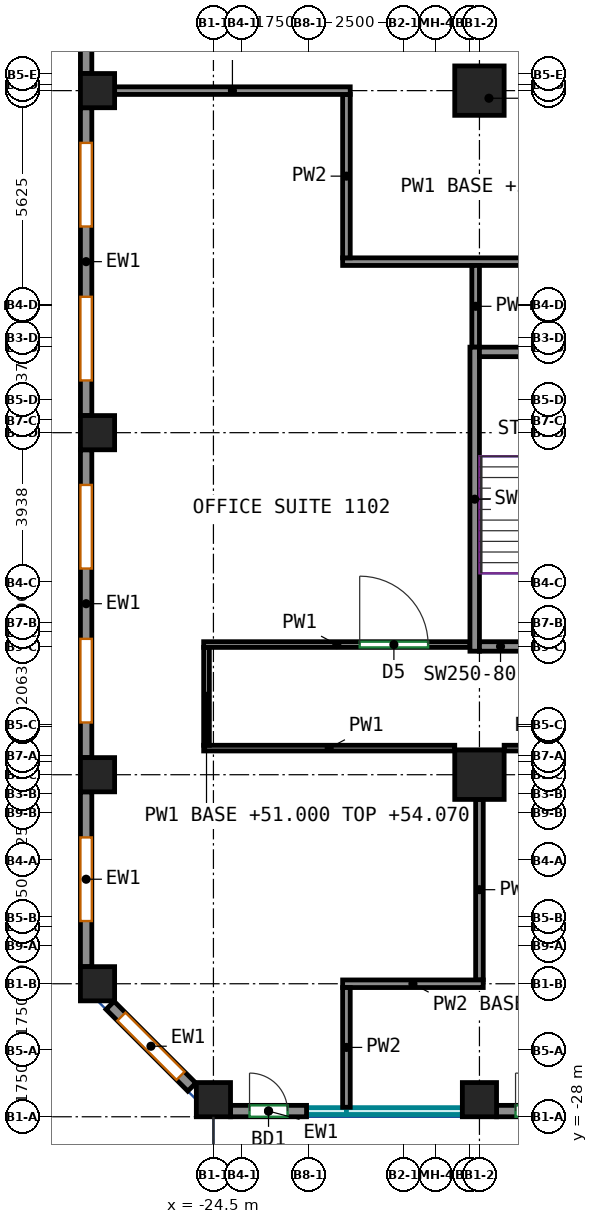
"""IFC4 building model, lengths in metres.
Left out: names, types, materials, properties, quantities, classifications, styles, units other than length and angle.
Written with IfcOpenShell. Run it as: python <this file> out.ifc"""

import sys

from ifc_helpers import new_model, si_unit, direction, frame, frame_2d, origin, origin_2d, place, context, subcontext, project, spatial, rectangle, extrude, source, transform, mapped, element, fill, save


model = new_model("IFC4")
c1 = context("Model", 3, precision=1e-05, world=origin(), true_north=direction((0.0, 1.0)))
c2 = subcontext(c1, "Body", "Model", "MODEL_VIEW")
j1 = project(units=[si_unit("LENGTHUNIT", "METRE"), si_unit("PLANEANGLEUNIT", "RADIAN")], contexts=[c1])
p1 = place(None, origin())
s1 = spatial("IfcSite", under=j1, at=p1, CompositionType="ELEMENT")
p2 = place(p1, origin())
s2 = spatial("IfcBuilding", under=s1, at=p2, CompositionType="ELEMENT")
p3 = place(p2, frame((0.0, 0.0, 51.0)))
s3 = spatial("IfcBuildingStorey", under=s2, at=p3, CompositionType="ELEMENT", Elevation=51.0)
m1 = source(origin(), c2, "Body", "SweptSolid", [
    extrude(rectangle(XDim=0.9, YDim=0.9, at=origin_2d()), origin(), (0.0, 0.0, 1.0), 3.72),
])
for number, where, z_axis, x_axis in (
    (1, (-27.55, -24.5, 0.0), (0.0, 0.0, 1.0), (1.0, 0.0, 0.0)),
    (2, (-27.55, -19.0, 0.0), (0.0, 0.0, 1.0), (1.0, 0.0, 0.0)),
    (3, (-27.55, -10.0, 0.0), (0.0, 0.0, 1.0), (1.0, 0.0, 0.0)),
    (4, (-27.55, -1.0, 0.0), (0.0, 0.0, 1.0), (1.0, 0.0, 0.0)),
    (5, (-24.5, -27.55, 0.0), (0.0, 0.0, 1.0), (1.0, 0.0, 0.0)),
    (6, (-17.5, -27.55, 0.0), (0.0, 0.0, 1.0), (1.0, 0.0, 0.0)),
):
    element("IfcColumn", number, at=place(p3, frame(where, z_axis=z_axis, x_axis=x_axis)), inside=s3, PredefinedType="COLUMN", context=c2, shape_type="MappedRepresentation", body=[
        mapped(m1, transform((0.0, 0.0, 0.0))),
    ])
m2 = source(origin(), c2, "Body", "SweptSolid", [
    extrude(rectangle(XDim=1.3, YDim=1.3, at=origin_2d()), origin(), (0.0, 0.0, 1.0), 3.72),
])
for number, where, z_axis, x_axis in (
    (7, (-17.5, -19.0, 0.0), (0.0, 0.0, 1.0), (1.0, 0.0, 0.0)),
    (8, (-17.5, -1.0, 0.0), (0.0, 0.0, 1.0), (1.0, 0.0, 0.0)),
):
    element("IfcColumn", number, at=place(p3, frame(where, z_axis=z_axis, x_axis=x_axis)), inside=s3, PredefinedType="COLUMN", context=c2, shape_type="MappedRepresentation", body=[
        mapped(m2, transform((0.0, 0.0, 0.0))),
    ])
m3 = source(origin(), c2, "Body", "SweptSolid", [
    extrude(rectangle(XDim=8.0, YDim=0.25, at=frame_2d((4.0, 0.0))), origin(), (0.0, 0.0, 1.0), 3.72),
])
p4 = place(p3, frame((-17.625, -15.75, 0.0), z_axis=(0.0, 0.0, 1.0), x_axis=(0.0, 1.0, 0.0)))
e9 = element("IfcWall", 9, at=p4, inside=s3, PredefinedType="SHEAR", context=c2, shape_type="MappedRepresentation", body=[
    mapped(m3, transform((0.0, 0.0, 0.0))),
])
m4 = source(origin(), c2, "Body", "SweptSolid", [
    extrude(rectangle(XDim=3.7, YDim=0.25, at=frame_2d((1.85, 0.0))), origin(), (0.0, 0.0, 1.0), 3.72),
])
p5 = place(p3, frame((-17.5, -15.625, 0.0), z_axis=(0.0, 0.0, 1.0), x_axis=(1.0, 0.0, 0.0)))
e10 = element("IfcWall", 10, at=p5, inside=s3, PredefinedType="SHEAR", context=c2, shape_type="MappedRepresentation", body=[
    mapped(m4, transform((0.0, 0.0, 0.0))),
])
p6 = place(p5, frame((1.25, 0.0, 0.0)))
e11 = element("IfcOpeningElement", 11, at=p6, cuts=e10, PredefinedType="OPENING", context=c2, shape_type="SweptSolid", body=[
    extrude(rectangle(XDim=1.2, YDim=2.1, at=frame_2d((0.6, 1.05))), frame((0.0, 0.135, 0.0), z_axis=(0.0, -1.0, 0.0), x_axis=(1.0, 0.0, 0.0)), (0.0, 0.0, 1.0), 0.27),
])
p7 = place(p3, frame((-17.5, -7.875, 0.0), z_axis=(0.0, 0.0, 1.0), x_axis=(1.0, 0.0, 0.0)))
e12 = element("IfcWall", 12, at=p7, inside=s3, PredefinedType="SHEAR", context=c2, shape_type="MappedRepresentation", body=[
    mapped(m4, transform((0.0, 0.0, 0.0))),
])
m5 = source(origin(), c2, "Body", "SweptSolid", [
    extrude(rectangle(XDim=2.0, YDim=0.3, at=frame_2d((1.0, 0.0))), origin(), (0.0, 0.0, 1.0), 3.72),
])
p8 = place(p3, frame((-24.05, -27.85, 0.0), z_axis=(0.0, 0.0, 1.0), x_axis=(1.0, 0.0, 0.0)))
e13 = element("IfcWall", 13, at=p8, inside=s3, PredefinedType="SOLIDWALL", context=c2, shape_type="MappedRepresentation", body=[
    mapped(m5, transform((0.0, 0.0, 0.0))),
])
p9 = place(p8, frame((0.5, 0.0, 0.0)))
e14 = element("IfcOpeningElement", 14, at=p9, cuts=e13, PredefinedType="OPENING", context=c2, shape_type="SweptSolid", body=[
    extrude(rectangle(XDim=1.0, YDim=2.1, at=frame_2d((0.5, 1.05))), frame((0.0, 0.16, 0.0), z_axis=(0.0, -1.0, 0.0), x_axis=(1.0, 0.0, 0.0)), (0.0, 0.0, 1.0), 0.32),
])
p10 = place(p3, frame((-17.05, -27.85, 0.0), z_axis=(0.0, 0.0, 1.0), x_axis=(1.0, 0.0, 0.0)))
e15 = element("IfcWall", 15, at=p10, inside=s3, PredefinedType="SOLIDWALL", context=c2, shape_type="MappedRepresentation", body=[
    mapped(m5, transform((0.0, 0.0, 0.0))),
])
p11 = place(p10, frame((0.5, 0.0, 0.0)))
e16 = element("IfcOpeningElement", 16, at=p11, cuts=e15, PredefinedType="OPENING", context=c2, shape_type="SweptSolid", body=[
    extrude(rectangle(XDim=1.0, YDim=2.1, at=frame_2d((0.5, 1.05))), frame((0.0, 0.16, 0.0), z_axis=(0.0, -1.0, 0.0), x_axis=(1.0, 0.0, 0.0)), (0.0, 0.0, 1.0), 0.32),
])
m6 = source(origin(), c2, "Body", "SweptSolid", [
    extrude(rectangle(XDim=8.1, YDim=0.3, at=frame_2d((4.05, 0.0))), origin(), (0.0, 0.0, 1.0), 3.72),
])
p12 = place(p3, frame((-27.85, 7.55, 0.0), z_axis=(0.0, 0.0, 1.0), x_axis=(0.0, -1.0, 0.0)))
e17 = element("IfcWall", 17, at=p12, inside=s3, PredefinedType="SOLIDWALL", context=c2, shape_type="MappedRepresentation", body=[
    mapped(m6, transform((0.0, 0.0, 0.0))),
])
p13 = place(p12, frame((0.925, 0.0, 0.7)))
e18 = element("IfcOpeningElement", 18, at=p13, cuts=e17, PredefinedType="OPENING", context=c2, shape_type="SweptSolid", body=[
    extrude(rectangle(XDim=2.2, YDim=2.25, at=frame_2d((1.1, 1.125))), frame((0.0, 0.16, 0.0), z_axis=(0.0, -1.0, 0.0), x_axis=(1.0, 0.0, 0.0)), (0.0, 0.0, 1.0), 0.32),
])
p14 = place(p12, frame((4.975, 0.0, 0.7)))
e19 = element("IfcOpeningElement", 19, at=p14, cuts=e17, PredefinedType="OPENING", context=c2, shape_type="SweptSolid", body=[
    extrude(rectangle(XDim=2.2, YDim=2.25, at=frame_2d((1.1, 1.125))), frame((0.0, 0.16, 0.0), z_axis=(0.0, -1.0, 0.0), x_axis=(1.0, 0.0, 0.0)), (0.0, 0.0, 1.0), 0.32),
])
p15 = place(p3, frame((-27.85, -1.45, 0.0), z_axis=(0.0, 0.0, 1.0), x_axis=(0.0, -1.0, 0.0)))
e20 = element("IfcWall", 20, at=p15, inside=s3, PredefinedType="SOLIDWALL", context=c2, shape_type="MappedRepresentation", body=[
    mapped(m6, transform((0.0, 0.0, 0.0))),
])
p16 = place(p15, frame((0.925, 0.0, 0.7)))
e21 = element("IfcOpeningElement", 21, at=p16, cuts=e20, PredefinedType="OPENING", context=c2, shape_type="SweptSolid", body=[
    extrude(rectangle(XDim=2.2, YDim=2.25, at=frame_2d((1.1, 1.125))), frame((0.0, 0.16, 0.0), z_axis=(0.0, -1.0, 0.0), x_axis=(1.0, 0.0, 0.0)), (0.0, 0.0, 1.0), 0.32),
])
p17 = place(p15, frame((4.975, 0.0, 0.7)))
e22 = element("IfcOpeningElement", 22, at=p17, cuts=e20, PredefinedType="OPENING", context=c2, shape_type="SweptSolid", body=[
    extrude(rectangle(XDim=2.2, YDim=2.25, at=frame_2d((1.1, 1.125))), frame((0.0, 0.16, 0.0), z_axis=(0.0, -1.0, 0.0), x_axis=(1.0, 0.0, 0.0)), (0.0, 0.0, 1.0), 0.32),
])
p18 = place(p3, frame((-27.85, -10.45, 0.0), z_axis=(0.0, 0.0, 1.0), x_axis=(0.0, -1.0, 0.0)))
e23 = element("IfcWall", 23, at=p18, inside=s3, PredefinedType="SOLIDWALL", context=c2, shape_type="MappedRepresentation", body=[
    mapped(m6, transform((0.0, 0.0, 0.0))),
])
p19 = place(p18, frame((0.925, 0.0, 0.7)))
e24 = element("IfcOpeningElement", 24, at=p19, cuts=e23, PredefinedType="OPENING", context=c2, shape_type="SweptSolid", body=[
    extrude(rectangle(XDim=2.2, YDim=2.25, at=frame_2d((1.1, 1.125))), frame((0.0, 0.16, 0.0), z_axis=(0.0, -1.0, 0.0), x_axis=(1.0, 0.0, 0.0)), (0.0, 0.0, 1.0), 0.32),
])
p20 = place(p18, frame((4.975, 0.0, 0.7)))
e25 = element("IfcOpeningElement", 25, at=p20, cuts=e23, PredefinedType="OPENING", context=c2, shape_type="SweptSolid", body=[
    extrude(rectangle(XDim=2.2, YDim=2.25, at=frame_2d((1.1, 1.125))), frame((0.0, 0.16, 0.0), z_axis=(0.0, -1.0, 0.0), x_axis=(1.0, 0.0, 0.0)), (0.0, 0.0, 1.0), 0.32),
])
m7 = source(origin(), c2, "Body", "SweptSolid", [
    extrude(rectangle(XDim=4.6, YDim=0.3, at=frame_2d((2.3, 0.0))), origin(), (0.0, 0.0, 1.0), 3.72),
])
p21 = place(p3, frame((-27.85, -19.45, 0.0), z_axis=(0.0, 0.0, 1.0), x_axis=(0.0, -1.0, 0.0)))
e26 = element("IfcWall", 26, at=p21, inside=s3, PredefinedType="SOLIDWALL", context=c2, shape_type="MappedRepresentation", body=[
    mapped(m7, transform((0.0, 0.0, 0.0))),
])
p22 = place(p21, frame((1.2, 0.0, 0.7)))
e27 = element("IfcOpeningElement", 27, at=p22, cuts=e26, PredefinedType="OPENING", context=c2, shape_type="SweptSolid", body=[
    extrude(rectangle(XDim=2.2, YDim=2.25, at=frame_2d((1.1, 1.125))), frame((0.0, 0.16, 0.0), z_axis=(0.0, -1.0, 0.0), x_axis=(1.0, 0.0, 0.0)), (0.0, 0.0, 1.0), 0.32),
])
m8 = source(origin(), c2, "Body", "SweptSolid", [
    extrude(rectangle(XDim=3.041, YDim=0.3, at=frame_2d((1.521, 0.0))), origin(), (0.0, 0.0, 1.0), 3.72),
])
p23 = place(p3, frame((-27.219, -25.069, 0.0), z_axis=(0.0, 0.0, 1.0), x_axis=(0.707106781187, -0.707106781187, 0.0)))
e28 = element("IfcWall", 28, at=p23, inside=s3, PredefinedType="SOLIDWALL", context=c2, shape_type="MappedRepresentation", body=[
    mapped(m8, transform((0.0, 0.0, 0.0))),
])
p24 = place(p23, frame((0.42, 0.0, 0.7)))
e29 = element("IfcOpeningElement", 29, at=p24, cuts=e28, PredefinedType="OPENING", context=c2, shape_type="SweptSolid", body=[
    extrude(rectangle(XDim=2.2, YDim=2.25, at=frame_2d((1.1, 1.125))), frame((0.0, 0.16, 0.0), z_axis=(0.0, -1.0, 0.0), x_axis=(1.0, 0.0, 0.0)), (0.0, 0.0, 1.0), 0.32),
])
p25 = place(p3, frame((-24.757, -18.3, 0.0), z_axis=(0.0, 0.0, 1.0), x_axis=(1.0, 0.0, 0.0)))
e30 = element("IfcWall", 30, at=p25, inside=s3, PredefinedType="PARTITIONING", context=c2, shape_type="SweptSolid", body=[
    extrude(rectangle(XDim=6.607, YDim=0.15, at=frame_2d((3.304, 0.0))), origin(), (0.0, 0.0, 1.0), 3.72),
])
p26 = place(p3, frame((-24.682, -15.65, 0.0), z_axis=(0.0, 0.0, 1.0), x_axis=(0.0, -1.0, 0.0)))
e31 = element("IfcWall", 31, at=p26, inside=s3, PredefinedType="PARTITIONING", context=c2, shape_type="SweptSolid", body=[
    extrude(rectangle(XDim=2.575, YDim=0.15, at=frame_2d((1.288, 0.0))), origin(), (0.0, 0.0, 1.0), 3.07),
])
p27 = place(p3, frame((-24.757, -15.575, 0.0), z_axis=(0.0, 0.0, 1.0), x_axis=(1.0, 0.0, 0.0)))
e32 = element("IfcWall", 32, at=p27, inside=s3, PredefinedType="PARTITIONING", context=c2, shape_type="SweptSolid", body=[
    extrude(rectangle(XDim=7.007, YDim=0.15, at=frame_2d((3.503, 0.0))), origin(), (0.0, 0.0, 1.0), 3.72),
])
p28 = place(p27, frame((4.106, 0.0, 0.0)))
e33 = element("IfcOpeningElement", 33, at=p28, cuts=e32, PredefinedType="OPENING", context=c2, shape_type="SweptSolid", body=[
    extrude(rectangle(XDim=1.8, YDim=2.1, at=frame_2d((0.9, 1.05))), frame((0.0, 0.085, 0.0), z_axis=(0.0, -1.0, 0.0), x_axis=(1.0, 0.0, 0.0)), (0.0, 0.0, 1.0), 0.17),
])
p29 = place(p3, frame((-16.85, -18.3, 0.0), z_axis=(0.0, 0.0, 1.0), x_axis=(1.0, 0.0, 0.0)))
e34 = element("IfcWall", 34, at=p29, inside=s3, PredefinedType="PARTITIONING", context=c2, shape_type="SweptSolid", body=[
    extrude(rectangle(XDim=5.7, YDim=0.15, at=frame_2d((2.85, 0.0))), origin(), (0.0, 0.0, 1.0), 3.72),
])
p30 = place(p29, frame((2.5, 0.0, 0.0)))
e35 = element("IfcOpeningElement", 35, at=p30, cuts=e34, PredefinedType="OPENING", context=c2, shape_type="SweptSolid", body=[
    extrude(rectangle(XDim=1.0, YDim=2.1, at=frame_2d((0.5, 1.05))), frame((0.0, 0.085, 0.0), z_axis=(0.0, -1.0, 0.0), x_axis=(1.0, 0.0, 0.0)), (0.0, 0.0, 1.0), 0.17),
])
p31 = place(p3, frame((-21.1, -5.5, 0.0), z_axis=(0.0, 0.0, 1.0), x_axis=(1.0, 0.0, 0.0)))
e36 = element("IfcWall", 36, at=p31, inside=s3, PredefinedType="PARTITIONING", context=c2, shape_type="SweptSolid", body=[
    extrude(rectangle(XDim=10.674, YDim=0.2, at=frame_2d((5.337, 0.0))), origin(), (0.0, 0.0, 1.0), 3.72),
])
p32 = place(p3, frame((-21.0, -5.4, 0.0), z_axis=(0.0, 0.0, 1.0), x_axis=(0.0, 1.0, 0.0)))
e37 = element("IfcWall", 37, at=p32, inside=s3, PredefinedType="PARTITIONING", context=c2, shape_type="SweptSolid", body=[
    extrude(rectangle(XDim=4.3, YDim=0.2, at=frame_2d((2.15, 0.0))), origin(), (0.0, 0.0, 1.0), 3.72),
])
p33 = place(p3, frame((-27.1, -1.0, 0.0), z_axis=(0.0, 0.0, 1.0), x_axis=(1.0, 0.0, 0.0)))
e38 = element("IfcWall", 38, at=p33, inside=s3, PredefinedType="PARTITIONING", context=c2, shape_type="SweptSolid", body=[
    extrude(rectangle(XDim=6.2, YDim=0.2, at=frame_2d((3.1, 0.0))), origin(), (0.0, 0.0, 1.0), 3.07),
])
p34 = place(p3, frame((-17.6, -7.75, 0.0), z_axis=(0.0, 0.0, 1.0), x_axis=(0.0, 1.0, 0.0)))
e39 = element("IfcWall", 39, at=p34, inside=s3, PredefinedType="PARTITIONING", context=c2, shape_type="SweptSolid", body=[
    extrude(rectangle(XDim=2.15, YDim=0.2, at=frame_2d((1.075, 0.0))), origin(), (0.0, 0.0, 1.0), 3.72),
])
p35 = place(p3, frame((-17.5, -24.4, 0.0), z_axis=(0.0, 0.0, 1.0), x_axis=(0.0, 1.0, 0.0)))
e40 = element("IfcWall", 40, at=p35, inside=s3, PredefinedType="PARTITIONING", context=c2, shape_type="SweptSolid", body=[
    extrude(rectangle(XDim=4.75, YDim=0.2, at=frame_2d((2.375, 0.0))), origin(), (0.0, 0.0, 1.0), 3.07),
])
p36 = place(p3, frame((-21.1, -24.5, 0.0), z_axis=(0.0, 0.0, 1.0), x_axis=(1.0, 0.0, 0.0)))
e41 = element("IfcWall", 41, at=p36, inside=s3, PredefinedType="PARTITIONING", context=c2, shape_type="SweptSolid", body=[
    extrude(rectangle(XDim=3.7, YDim=0.2, at=frame_2d((1.85, 0.0))), origin(), (0.0, 0.0, 1.0), 3.07),
])
p37 = place(p3, frame((-21.0, -27.75, 0.0), z_axis=(0.0, 0.0, 1.0), x_axis=(0.0, 1.0, 0.0)))
e42 = element("IfcWall", 42, at=p37, inside=s3, PredefinedType="PARTITIONING", context=c2, shape_type="SweptSolid", body=[
    extrude(rectangle(XDim=3.15, YDim=0.2, at=frame_2d((1.575, 0.0))), origin(), (0.0, 0.0, 1.0), 3.72),
])
p38 = place(p9, origin())
e43 = element("IfcDoor", 43, at=p38, inside=s3, OperationType="SINGLE_SWING_LEFT", PredefinedType="DOOR", context=c2, shape_type="SweptSolid", body=[
    extrude(rectangle(XDim=1.0, YDim=2.1, at=frame_2d((0.5, 1.05))), frame((0.0, 0.025, 0.0), z_axis=(0.0, -1.0, 0.0), x_axis=(1.0, 0.0, 0.0)), (0.0, 0.0, 1.0), 0.05),
])
fill(e14, e43)
p39 = place(p11, origin())
e44 = element("IfcDoor", 44, at=p39, inside=s3, OperationType="SINGLE_SWING_LEFT", PredefinedType="DOOR", context=c2, shape_type="SweptSolid", body=[
    extrude(rectangle(XDim=1.0, YDim=2.1, at=frame_2d((0.5, 1.05))), frame((0.0, 0.025, 0.0), z_axis=(0.0, -1.0, 0.0), x_axis=(1.0, 0.0, 0.0)), (0.0, 0.0, 1.0), 0.05),
])
fill(e16, e44)
p40 = place(p16, origin())
e45 = element("IfcWindow", 45, at=p40, inside=s3, PartitioningType="SINGLE_PANEL", PredefinedType="WINDOW", context=c2, shape_type="SweptSolid", body=[
    extrude(rectangle(XDim=2.2, YDim=2.25, at=frame_2d((1.1, 1.125))), frame((0.0, 0.03, 0.0), z_axis=(0.0, -1.0, 0.0), x_axis=(1.0, 0.0, 0.0)), (0.0, 0.0, 1.0), 0.06),
])
fill(e21, e45)
p41 = place(p17, origin())
e46 = element("IfcWindow", 46, at=p41, inside=s3, PartitioningType="SINGLE_PANEL", PredefinedType="WINDOW", context=c2, shape_type="SweptSolid", body=[
    extrude(rectangle(XDim=2.2, YDim=2.25, at=frame_2d((1.1, 1.125))), frame((0.0, 0.03, 0.0), z_axis=(0.0, -1.0, 0.0), x_axis=(1.0, 0.0, 0.0)), (0.0, 0.0, 1.0), 0.06),
])
fill(e22, e46)
p42 = place(p19, origin())
e47 = element("IfcWindow", 47, at=p42, inside=s3, PartitioningType="SINGLE_PANEL", PredefinedType="WINDOW", context=c2, shape_type="SweptSolid", body=[
    extrude(rectangle(XDim=2.2, YDim=2.25, at=frame_2d((1.1, 1.125))), frame((0.0, 0.03, 0.0), z_axis=(0.0, -1.0, 0.0), x_axis=(1.0, 0.0, 0.0)), (0.0, 0.0, 1.0), 0.06),
])
fill(e24, e47)
p43 = place(p20, origin())
e48 = element("IfcWindow", 48, at=p43, inside=s3, PartitioningType="SINGLE_PANEL", PredefinedType="WINDOW", context=c2, shape_type="SweptSolid", body=[
    extrude(rectangle(XDim=2.2, YDim=2.25, at=frame_2d((1.1, 1.125))), frame((0.0, 0.03, 0.0), z_axis=(0.0, -1.0, 0.0), x_axis=(1.0, 0.0, 0.0)), (0.0, 0.0, 1.0), 0.06),
])
fill(e25, e48)
p44 = place(p22, origin())
e49 = element("IfcWindow", 49, at=p44, inside=s3, PartitioningType="SINGLE_PANEL", PredefinedType="WINDOW", context=c2, shape_type="SweptSolid", body=[
    extrude(rectangle(XDim=2.2, YDim=2.25, at=frame_2d((1.1, 1.125))), frame((0.0, 0.03, 0.0), z_axis=(0.0, -1.0, 0.0), x_axis=(1.0, 0.0, 0.0)), (0.0, 0.0, 1.0), 0.06),
])
fill(e27, e49)
p45 = place(p24, origin())
e50 = element("IfcWindow", 50, at=p45, inside=s3, PartitioningType="SINGLE_PANEL", PredefinedType="WINDOW", context=c2, shape_type="SweptSolid", body=[
    extrude(rectangle(XDim=2.2, YDim=2.25, at=frame_2d((1.1, 1.125))), frame((0.0, 0.03, 0.0), z_axis=(0.0, -1.0, 0.0), x_axis=(1.0, 0.0, 0.0)), (0.0, 0.0, 1.0), 0.06),
])
fill(e29, e50)
p46 = place(p28, origin())
e51 = element("IfcDoor", 51, at=p46, inside=s3, OperationType="DOUBLE_DOOR_SINGLE_SWING", PredefinedType="DOOR", context=c2, shape_type="SweptSolid", body=[
    extrude(rectangle(XDim=1.8, YDim=2.1, at=frame_2d((0.9, 1.05))), frame((0.0, 0.025, 0.0), z_axis=(0.0, -1.0, 0.0), x_axis=(1.0, 0.0, 0.0)), (0.0, 0.0, 1.0), 0.05),
])
fill(e33, e51)
save(model, sys.argv[1])
